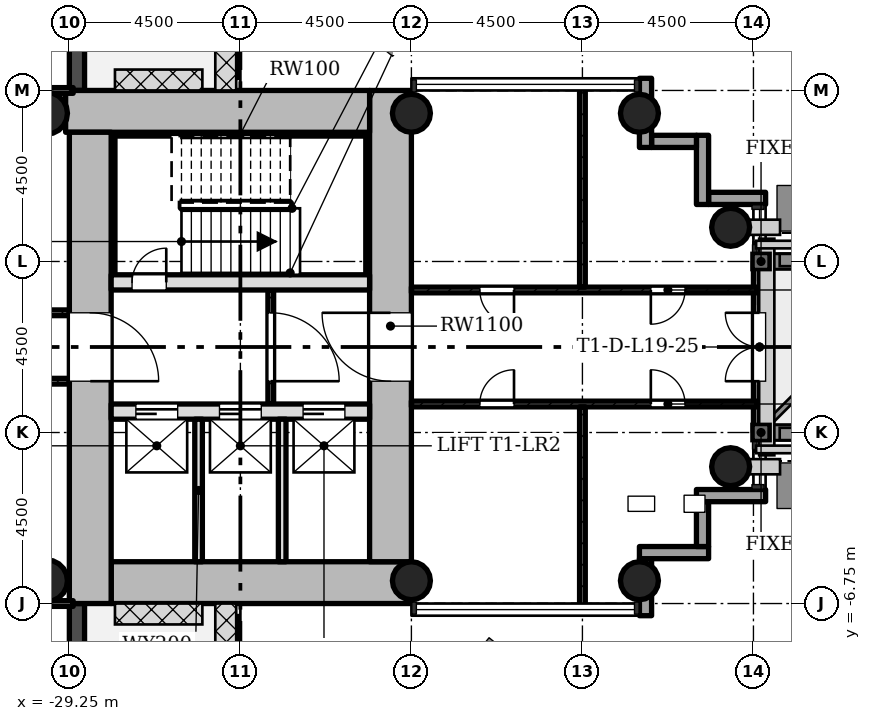
"""IFC4 building model, lengths in metres.
Left out: names, types, materials, properties, quantities, classifications, styles, units other than length and angle.
Written with IfcOpenShell. Run it as: python <this file> out.ifc"""

import sys

from ifc_helpers import new_model, si_unit, direction, frame, frame_2d, origin, origin_2d, place, context, subcontext, project, spatial, rectangle, hollow_circle, extrude, element, fill, save


model = new_model("IFC4")
c1 = context("Model", 3, precision=1e-05, world=origin(), true_north=direction((0.0, 1.0)))
c2 = subcontext(c1, "Body", "Model", "MODEL_VIEW")
j1 = project(units=[si_unit("LENGTHUNIT", "METRE"), si_unit("PLANEANGLEUNIT", "RADIAN")], contexts=[c1])
p1 = place(None, origin())
s1 = spatial("IfcSite", under=j1, at=p1, CompositionType="ELEMENT")
p2 = place(p1, origin())
s2 = spatial("IfcBuilding", under=s1, at=p2, CompositionType="ELEMENT")
p3 = place(p2, frame((0.0, 0.0, 72.1)))
s3 = spatial("IfcBuildingStorey", under=s2, at=p3, CompositionType="ELEMENT", Elevation=72.1)
p4 = place(p3, frame((-28.15, -6.2, 0.0), z_axis=(0.0, 0.0, 1.0), x_axis=(1.0, 0.0, 0.0)))
e1 = element("IfcWall", 1, at=p4, inside=s3, PredefinedType="SHEAR", context=c2, shape_type="SweptSolid", body=[
    extrude(rectangle(XDim=7.9, YDim=1.1, at=frame_2d((3.95, 0.0))), origin(), (0.0, 0.0, 1.0), 4.5),
])
p5 = place(p3, frame((-20.8, -5.65, 0.0), z_axis=(0.0, 0.0, 1.0), x_axis=(0.0, 1.0, 0.0)))
e2 = element("IfcWall", 2, at=p5, inside=s3, PredefinedType="SHEAR", context=c2, shape_type="SweptSolid", body=[
    extrude(rectangle(XDim=12.4, YDim=1.1, at=frame_2d((6.2, 0.0))), origin(), (0.0, 0.0, 1.0), 4.5),
])
p6 = place(p5, frame((4.75, 0.0, 0.0)))
e3 = element("IfcOpeningElement", 3, at=p6, cuts=e2, PredefinedType="OPENING", context=c2, shape_type="SweptSolid", body=[
    extrude(rectangle(XDim=1.8, YDim=2.1, at=frame_2d((0.9, 1.05))), frame((0.0, 0.56, 0.0), z_axis=(0.0, -1.0, 0.0), x_axis=(1.0, 0.0, 0.0)), (0.0, 0.0, 1.0), 1.12),
])
p7 = place(p3, frame((-21.35, 6.2, 0.0), z_axis=(0.0, 0.0, 1.0), x_axis=(-1.0, 0.0, 0.0)))
e4 = element("IfcWall", 4, at=p7, inside=s3, PredefinedType="SHEAR", context=c2, shape_type="SweptSolid", body=[
    extrude(rectangle(XDim=7.998, YDim=1.1, at=frame_2d((3.999, 0.0))), origin(), (0.0, 0.0, 1.0), 4.5),
])
p8 = place(p3, frame((-28.7, 5.65, 0.0), z_axis=(0.0, 0.0, 1.0), x_axis=(0.0, -1.0, 0.0)))
e5 = element("IfcWall", 5, at=p8, inside=s3, PredefinedType="SHEAR", context=c2, shape_type="SweptSolid", body=[
    extrude(rectangle(XDim=12.4, YDim=1.1, at=frame_2d((6.2, 0.0))), origin(), (0.0, 0.0, 1.0), 4.5),
])
p9 = place(p8, frame((4.75, 0.0, 0.0)))
e6 = element("IfcOpeningElement", 6, at=p9, cuts=e5, PredefinedType="OPENING", context=c2, shape_type="SweptSolid", body=[
    extrude(rectangle(XDim=1.8, YDim=2.1, at=frame_2d((0.9, 1.05))), frame((0.0, 0.56, 0.0), z_axis=(0.0, -1.0, 0.0), x_axis=(1.0, 0.0, 0.0)), (0.0, 0.0, 1.0), 1.12),
])
p10 = place(p3, frame((-28.15, -1.7, 0.0), z_axis=(0.0, 0.0, 1.0), x_axis=(1.0, 0.0, 0.0)))
e7 = element("IfcWall", 7, at=p10, inside=s3, PredefinedType="SHEAR", context=c2, shape_type="SweptSolid", body=[
    extrude(rectangle(XDim=6.8, YDim=0.4, at=frame_2d((3.4, 0.0))), origin(), (0.0, 0.0, 1.0), 4.5),
])
p11 = place(p10, frame((0.65, 0.0, 0.0)))
e8 = element("IfcOpeningElement", 8, at=p11, cuts=e7, PredefinedType="OPENING", context=c2, shape_type="SweptSolid", body=[
    extrude(rectangle(XDim=1.1, YDim=2.1, at=frame_2d((0.55, 1.05))), frame((0.0, 0.21, 0.0), z_axis=(0.0, -1.0, 0.0), x_axis=(1.0, 0.0, 0.0)), (0.0, 0.0, 1.0), 0.42),
])
p12 = place(p10, frame((2.85, 0.0, 0.0)))
e9 = element("IfcOpeningElement", 9, at=p12, cuts=e7, PredefinedType="OPENING", context=c2, shape_type="SweptSolid", body=[
    extrude(rectangle(XDim=1.1, YDim=2.1, at=frame_2d((0.55, 1.05))), frame((0.0, 0.21, 0.0), z_axis=(0.0, -1.0, 0.0), x_axis=(1.0, 0.0, 0.0)), (0.0, 0.0, 1.0), 0.42),
])
p13 = place(p10, frame((5.05, 0.0, 0.0)))
e10 = element("IfcOpeningElement", 10, at=p13, cuts=e7, PredefinedType="OPENING", context=c2, shape_type="SweptSolid", body=[
    extrude(rectangle(XDim=1.1, YDim=2.1, at=frame_2d((0.55, 1.05))), frame((0.0, 0.21, 0.0), z_axis=(0.0, -1.0, 0.0), x_axis=(1.0, 0.0, 0.0)), (0.0, 0.0, 1.0), 0.42),
])
p14 = place(p3, frame((-28.15, 1.7, 0.0), z_axis=(0.0, 0.0, 1.0), x_axis=(1.0, 0.0, 0.0)))
e11 = element("IfcWall", 11, at=p14, inside=s3, PredefinedType="SHEAR", context=c2, shape_type="SweptSolid", body=[
    extrude(rectangle(XDim=6.8, YDim=0.4, at=frame_2d((3.4, 0.0))), origin(), (0.0, 0.0, 1.0), 4.5),
])
p15 = place(p14, frame((0.55, 0.0, 0.0)))
e12 = element("IfcOpeningElement", 12, at=p15, cuts=e11, PredefinedType="OPENING", context=c2, shape_type="SweptSolid", body=[
    extrude(rectangle(XDim=0.9, YDim=2.1, at=frame_2d((0.45, 1.05))), frame((0.0, 0.21, 0.0), z_axis=(0.0, -1.0, 0.0), x_axis=(1.0, 0.0, 0.0)), (0.0, 0.0, 1.0), 0.42),
])
for number, where, z_axis, x_axis in (
    (13, (-20.25, -6.15, 0.0), (0.0, 0.0, 1.0), (1.0, 0.0, 0.0)),
    (14, (-20.25, 6.15, 0.0), (0.0, 0.0, 1.0), (1.0, 0.0, 0.0)),
    (15, (-14.25, -6.15, 0.0), (0.0, 0.0, 1.0), (1.0, 0.0, 0.0)),
    (16, (-14.25, 6.15, 0.0), (0.0, 0.0, 1.0), (1.0, 0.0, 0.0)),
    (17, (-11.85, -3.15, 0.0), (0.0, 0.0, 1.0), (1.0, 0.0, 0.0)),
    (18, (-11.85, 3.15, 0.0), (0.0, 0.0, 1.0), (1.0, 0.0, 0.0)),
):
    element("IfcColumn", number, at=place(p3, frame(where, z_axis=z_axis, x_axis=x_axis)), inside=s3, PredefinedType="COLUMN", context=c2, shape_type="SweptSolid", body=[
        extrude(hollow_circle(Radius=0.5, WallThickness=0.036, at=origin_2d()), origin(), (0.0, 0.0, 1.0), 4.5),
    ])
for number, where, z_axis, x_axis in (
    (19, (-29.85, -6.15, 0.0), (0.0, 0.0, 1.0), (1.0, 0.0, 0.0)),
    (20, (-29.85, 6.15, 0.0), (0.0, 0.0, 1.0), (1.0, 0.0, 0.0)),
):
    element("IfcColumn", number, at=place(p3, frame(where, z_axis=z_axis, x_axis=x_axis)), inside=s3, PredefinedType="COLUMN", context=c2, shape_type="SweptSolid", body=[
        extrude(hollow_circle(Radius=0.55, WallThickness=0.04, at=origin_2d()), origin(), (0.0, 0.0, 1.0), 4.5),
    ])
p16 = place(p3, frame((-29.05, -11.25, -0.02), z_axis=(0.0, 0.0, 1.0), x_axis=(0.0, 1.0, 0.0)))
e21 = element("IfcWall", 21, at=p16, inside=s3, PredefinedType="STANDARD", context=c2, shape_type="SweptSolid", body=[
    extrude(rectangle(XDim=4.5, YDim=0.4, at=frame_2d((2.25, 0.0))), origin(), (0.0, 0.0, 1.0), 4.22),
])
p17 = place(p16, frame((1.35, 0.0, 0.02)))
e22 = element("IfcOpeningElement", 22, at=p17, cuts=e21, PredefinedType="OPENING", context=c2, shape_type="SweptSolid", body=[
    extrude(rectangle(XDim=1.8, YDim=2.1, at=frame_2d((0.9, 1.05))), frame((0.0, 0.21, 0.0), z_axis=(0.0, -1.0, 0.0), x_axis=(1.0, 0.0, 0.0)), (0.0, 0.0, 1.0), 0.42),
])
p18 = place(p3, frame((-14.09, -7.07, -0.3), z_axis=(0.0, 0.0, 1.0), x_axis=(0.0, 1.0, 0.0)))
e23 = element("IfcWall", 23, at=p18, inside=s3, PredefinedType="STANDARD", context=c2, shape_type="SweptSolid", body=[
    extrude(rectangle(XDim=1.5, YDim=0.32, at=frame_2d((0.75, 0.0))), origin(), (0.0, 0.0, 1.0), 4.5),
])
p19 = place(p3, frame((-14.25, -5.41, -0.3), z_axis=(0.0, 0.0, 1.0), x_axis=(1.0, 0.0, 0.0)))
e24 = element("IfcWall", 24, at=p19, inside=s3, PredefinedType="STANDARD", context=c2, shape_type="SweptSolid", body=[
    extrude(rectangle(XDim=1.82, YDim=0.32, at=frame_2d((0.91, 0.0))), origin(), (0.0, 0.0, 1.0), 4.5),
])
p20 = place(p3, frame((-12.59, -5.25, -0.3), z_axis=(0.0, 0.0, 1.0), x_axis=(0.0, 1.0, 0.0)))
e25 = element("IfcWall", 25, at=p20, inside=s3, PredefinedType="STANDARD", context=c2, shape_type="SweptSolid", body=[
    extrude(rectangle(XDim=1.18, YDim=0.32, at=frame_2d((0.59, 0.0))), origin(), (0.0, 0.0, 1.0), 4.5),
])
p21 = place(p3, frame((-12.75, -3.91, -0.3), z_axis=(0.0, 0.0, 1.0), x_axis=(1.0, 0.0, 0.0)))
e26 = element("IfcWall", 26, at=p21, inside=s3, PredefinedType="STANDARD", context=c2, shape_type="SweptSolid", body=[
    extrude(rectangle(XDim=1.82, YDim=0.32, at=frame_2d((0.91, 0.0))), origin(), (0.0, 0.0, 1.0), 4.5),
])
p22 = place(p3, frame((-11.09, -2.25, -0.12), z_axis=(0.0, 0.0, 1.0), x_axis=(0.0, 1.0, 0.0)))
e27 = element("IfcWall", 27, at=p22, inside=s3, PredefinedType="STANDARD", context=c2, shape_type="SweptSolid", body=[
    extrude(rectangle(XDim=4.5, YDim=0.32, at=frame_2d((2.25, 0.0))), origin(), (0.0, 0.0, 1.0), 4.32),
])
p23 = place(p22, frame((1.35, 0.0, 0.0)))
e28 = element("IfcOpeningElement", 28, at=p23, cuts=e27, PredefinedType="OPENING", context=c2, shape_type="SweptSolid", body=[
    extrude(rectangle(XDim=1.8, YDim=2.1, at=frame_2d((0.9, 1.05))), frame((0.0, 0.17, 0.0), z_axis=(0.0, -1.0, 0.0), x_axis=(1.0, 0.0, 0.0)), (0.0, 0.0, 1.0), 0.34),
])
p24 = place(p3, frame((-10.93, 3.91, -0.3), z_axis=(0.0, 0.0, 1.0), x_axis=(-1.0, 0.0, 0.0)))
e29 = element("IfcWall", 29, at=p24, inside=s3, PredefinedType="STANDARD", context=c2, shape_type="SweptSolid", body=[
    extrude(rectangle(XDim=1.5, YDim=0.32, at=frame_2d((0.75, 0.0))), origin(), (0.0, 0.0, 1.0), 4.5),
])
p25 = place(p3, frame((-12.59, 3.75, -0.3), z_axis=(0.0, 0.0, 1.0), x_axis=(0.0, 1.0, 0.0)))
e30 = element("IfcWall", 30, at=p25, inside=s3, PredefinedType="STANDARD", context=c2, shape_type="SweptSolid", body=[
    extrude(rectangle(XDim=1.82, YDim=0.32, at=frame_2d((0.91, 0.0))), origin(), (0.0, 0.0, 1.0), 4.5),
])
p26 = place(p3, frame((-12.75, 5.41, -0.3), z_axis=(0.0, 0.0, 1.0), x_axis=(-1.0, 0.0, 0.0)))
e31 = element("IfcWall", 31, at=p26, inside=s3, PredefinedType="STANDARD", context=c2, shape_type="SweptSolid", body=[
    extrude(rectangle(XDim=1.18, YDim=0.32, at=frame_2d((0.59, 0.0))), origin(), (0.0, 0.0, 1.0), 4.5),
])
p27 = place(p3, frame((-14.09, 5.25, -0.3), z_axis=(0.0, 0.0, 1.0), x_axis=(0.0, 1.0, 0.0)))
e32 = element("IfcWall", 32, at=p27, inside=s3, PredefinedType="STANDARD", context=c2, shape_type="SweptSolid", body=[
    extrude(rectangle(XDim=1.82, YDim=0.32, at=frame_2d((0.91, 0.0))), origin(), (0.0, 0.0, 1.0), 4.5),
])
p28 = place(p3, frame((-29.05, 6.75, -0.02), z_axis=(0.0, 0.0, 1.0), x_axis=(0.0, 1.0, 0.0)))
e33 = element("IfcWall", 33, at=p28, inside=s3, PredefinedType="STANDARD", context=c2, shape_type="SweptSolid", body=[
    extrude(rectangle(XDim=4.5, YDim=0.4, at=frame_2d((2.25, 0.0))), origin(), (0.0, 0.0, 1.0), 4.22),
])
p29 = place(p28, frame((1.35, 0.0, 0.02)))
e34 = element("IfcOpeningElement", 34, at=p29, cuts=e33, PredefinedType="OPENING", context=c2, shape_type="SweptSolid", body=[
    extrude(rectangle(XDim=1.8, YDim=2.1, at=frame_2d((0.9, 1.05))), frame((0.0, 0.21, 0.0), z_axis=(0.0, -1.0, 0.0), x_axis=(1.0, 0.0, 0.0)), (0.0, 0.0, 1.0), 0.42),
])
p30 = place(p3, frame((-23.95, -1.5, 0.0), z_axis=(0.0, 0.0, 1.0), x_axis=(0.0, 1.0, 0.0)))
e35 = element("IfcWall", 35, at=p30, inside=s3, PredefinedType="PARTITIONING", context=c2, shape_type="SweptSolid", body=[
    extrude(rectangle(XDim=3.0, YDim=0.15, at=frame_2d((1.5, 0.0))), origin(), (0.0, 0.0, 1.0), 4.08),
])
p31 = place(p30, frame((0.6, 0.0, 0.0)))
e36 = element("IfcOpeningElement", 36, at=p31, cuts=e35, PredefinedType="OPENING", context=c2, shape_type="SweptSolid", body=[
    extrude(rectangle(XDim=1.8, YDim=2.1, at=frame_2d((0.9, 1.05))), frame((0.0, 0.085, 0.0), z_axis=(0.0, -1.0, 0.0), x_axis=(1.0, 0.0, 0.0)), (0.0, 0.0, 1.0), 0.17),
])
for number, where, z_axis, x_axis in (
    (37, (-25.85, -5.65, 0.0), (0.0, 0.0, 1.0), (0.0, 1.0, 0.0)),
    (38, (-23.65, -5.65, 0.0), (0.0, 0.0, 1.0), (0.0, 1.0, 0.0)),
):
    element("IfcWall", number, at=place(p3, frame(where, z_axis=z_axis, x_axis=x_axis)), inside=s3, PredefinedType="SOLIDWALL", context=c2, shape_type="SweptSolid", body=[
        extrude(rectangle(XDim=3.75, YDim=0.2, at=frame_2d((1.875, 0.0))), origin(), (0.0, 0.0, 1.0), 4.08),
    ])
p32 = place(p3, frame((-35.1, 0.9, 0.0), z_axis=(0.0, 0.0, 1.0), x_axis=(1.0, 0.0, 0.0)))
e39 = element("IfcWall", 39, at=p32, inside=s3, PredefinedType="PARTITIONING", context=c2, shape_type="SweptSolid", body=[
    extrude(rectangle(XDim=5.85, YDim=0.15, at=frame_2d((2.925, 0.0))), origin(), (0.0, 0.0, 1.0), 4.08),
])
p33 = place(p32, frame((2.475, 0.0, 0.0)))
e40 = element("IfcOpeningElement", 40, at=p33, cuts=e39, PredefinedType="OPENING", context=c2, shape_type="SweptSolid", body=[
    extrude(rectangle(XDim=0.9, YDim=2.1, at=frame_2d((0.45, 1.05))), frame((0.0, 0.085, 0.0), z_axis=(0.0, -1.0, 0.0), x_axis=(1.0, 0.0, 0.0)), (0.0, 0.0, 1.0), 0.17),
])
p34 = place(p3, frame((-35.1, -0.9, 0.0), z_axis=(0.0, 0.0, 1.0), x_axis=(1.0, 0.0, 0.0)))
e41 = element("IfcWall", 41, at=p34, inside=s3, PredefinedType="PARTITIONING", context=c2, shape_type="SweptSolid", body=[
    extrude(rectangle(XDim=5.85, YDim=0.15, at=frame_2d((2.925, 0.0))), origin(), (0.0, 0.0, 1.0), 4.08),
])
p35 = place(p34, frame((2.475, 0.0, 0.0)))
e42 = element("IfcOpeningElement", 42, at=p35, cuts=e41, PredefinedType="OPENING", context=c2, shape_type="SweptSolid", body=[
    extrude(rectangle(XDim=0.9, YDim=2.1, at=frame_2d((0.45, 1.05))), frame((0.0, 0.085, 0.0), z_axis=(0.0, -1.0, 0.0), x_axis=(1.0, 0.0, 0.0)), (0.0, 0.0, 1.0), 0.17),
])
p36 = place(p3, frame((-20.25, 1.5, 0.0), z_axis=(0.0, 0.0, 1.0), x_axis=(1.0, 0.0, 0.0)))
e43 = element("IfcWall", 43, at=p36, inside=s3, PredefinedType="PARTITIONING", context=c2, shape_type="SweptSolid", body=[
    extrude(rectangle(XDim=9.1, YDim=0.15, at=frame_2d((4.55, 0.0))), origin(), (0.0, 0.0, 1.0), 4.08),
])
p37 = place(p36, frame((1.8, 0.0, 0.0)))
e44 = element("IfcOpeningElement", 44, at=p37, cuts=e43, PredefinedType="OPENING", context=c2, shape_type="SweptSolid", body=[
    extrude(rectangle(XDim=0.9, YDim=2.1, at=frame_2d((0.45, 1.05))), frame((0.0, 0.085, 0.0), z_axis=(0.0, -1.0, 0.0), x_axis=(1.0, 0.0, 0.0)), (0.0, 0.0, 1.0), 0.17),
])
p38 = place(p36, frame((6.3, 0.0, 0.0)))
e45 = element("IfcOpeningElement", 45, at=p38, cuts=e43, PredefinedType="OPENING", context=c2, shape_type="SweptSolid", body=[
    extrude(rectangle(XDim=0.9, YDim=2.1, at=frame_2d((0.45, 1.05))), frame((0.0, 0.085, 0.0), z_axis=(0.0, -1.0, 0.0), x_axis=(1.0, 0.0, 0.0)), (0.0, 0.0, 1.0), 0.17),
])
p39 = place(p3, frame((-15.75, 1.575, 0.0), z_axis=(0.0, 0.0, 1.0), x_axis=(0.0, 1.0, 0.0)))
e46 = element("IfcWall", 46, at=p39, inside=s3, PredefinedType="PARTITIONING", context=c2, shape_type="SweptSolid", body=[
    extrude(rectangle(XDim=5.275, YDim=0.15, at=frame_2d((2.638, 0.0))), origin(), (0.0, 0.0, 1.0), 4.08),
])
p40 = place(p3, frame((-20.25, -1.5, 0.0), z_axis=(0.0, 0.0, 1.0), x_axis=(1.0, 0.0, 0.0)))
e47 = element("IfcWall", 47, at=p40, inside=s3, PredefinedType="PARTITIONING", context=c2, shape_type="SweptSolid", body=[
    extrude(rectangle(XDim=9.1, YDim=0.15, at=frame_2d((4.55, 0.0))), origin(), (0.0, 0.0, 1.0), 4.08),
])
p41 = place(p40, frame((1.8, 0.0, 0.0)))
e48 = element("IfcOpeningElement", 48, at=p41, cuts=e47, PredefinedType="OPENING", context=c2, shape_type="SweptSolid", body=[
    extrude(rectangle(XDim=0.9, YDim=2.1, at=frame_2d((0.45, 1.05))), frame((0.0, 0.085, 0.0), z_axis=(0.0, -1.0, 0.0), x_axis=(1.0, 0.0, 0.0)), (0.0, 0.0, 1.0), 0.17),
])
p42 = place(p40, frame((6.3, 0.0, 0.0)))
e49 = element("IfcOpeningElement", 49, at=p42, cuts=e47, PredefinedType="OPENING", context=c2, shape_type="SweptSolid", body=[
    extrude(rectangle(XDim=0.9, YDim=2.1, at=frame_2d((0.45, 1.05))), frame((0.0, 0.085, 0.0), z_axis=(0.0, -1.0, 0.0), x_axis=(1.0, 0.0, 0.0)), (0.0, 0.0, 1.0), 0.17),
])
p43 = place(p3, frame((-15.75, -1.575, 0.0), z_axis=(0.0, 0.0, 1.0), x_axis=(0.0, -1.0, 0.0)))
e50 = element("IfcWall", 50, at=p43, inside=s3, PredefinedType="PARTITIONING", context=c2, shape_type="SweptSolid", body=[
    extrude(rectangle(XDim=5.275, YDim=0.15, at=frame_2d((2.638, 0.0))), origin(), (0.0, 0.0, 1.0), 4.08),
])
p44 = place(p3, frame((-42.85, 6.75, 0.0), z_axis=(0.0, 0.0, 1.0), x_axis=(1.0, 0.0, 0.0)))
e51 = element("IfcWall", 51, at=p44, inside=s3, PredefinedType="PARTITIONING", context=c2, shape_type="SweptSolid", body=[
    extrude(rectangle(XDim=13.7, YDim=0.15, at=frame_2d((6.85, 0.0))), origin(), (0.0, 0.0, 1.0), 4.08),
])
p45 = place(p44, frame((5.95, 0.0, 0.0)))
e52 = element("IfcOpeningElement", 52, at=p45, cuts=e51, PredefinedType="OPENING", context=c2, shape_type="SweptSolid", body=[
    extrude(rectangle(XDim=1.8, YDim=2.1, at=frame_2d((0.9, 1.05))), frame((0.0, 0.085, 0.0), z_axis=(0.0, -1.0, 0.0), x_axis=(1.0, 0.0, 0.0)), (0.0, 0.0, 1.0), 0.17),
])
p46 = place(p3, frame((-42.85, -6.75, 0.0), z_axis=(0.0, 0.0, 1.0), x_axis=(1.0, 0.0, 0.0)))
e53 = element("IfcWall", 53, at=p46, inside=s3, PredefinedType="PARTITIONING", context=c2, shape_type="SweptSolid", body=[
    extrude(rectangle(XDim=13.7, YDim=0.15, at=frame_2d((6.85, 0.0))), origin(), (0.0, 0.0, 1.0), 4.08),
])
p47 = place(p46, frame((5.95, 0.0, 0.0)))
e54 = element("IfcOpeningElement", 54, at=p47, cuts=e53, PredefinedType="OPENING", context=c2, shape_type="SweptSolid", body=[
    extrude(rectangle(XDim=1.8, YDim=2.1, at=frame_2d((0.9, 1.05))), frame((0.0, 0.085, 0.0), z_axis=(0.0, -1.0, 0.0), x_axis=(1.0, 0.0, 0.0)), (0.0, 0.0, 1.0), 0.17),
])
p48 = place(p3, frame((-21.4, 1.9, 0.0), z_axis=(0.0, 0.0, 1.0), x_axis=(0.0, 1.0, 0.0)))
e55 = element("IfcWall", 55, at=p48, inside=s3, PredefinedType="SHEAR", context=c2, shape_type="SweptSolid", body=[
    extrude(rectangle(XDim=3.75, YDim=0.1, at=frame_2d((1.875, 0.0))), origin(), (0.0, 0.0, 1.0), 4.5),
])
p49 = place(p3, frame((-28.05, 5.6, 0.0), z_axis=(0.0, 0.0, 1.0), x_axis=(1.0, 0.0, 0.0)))
e56 = element("IfcWall", 56, at=p49, inside=s3, PredefinedType="SHEAR", context=c2, shape_type="SweptSolid", body=[
    extrude(rectangle(XDim=6.6, YDim=0.1, at=frame_2d((3.3, 0.0))), origin(), (0.0, 0.0, 1.0), 4.5),
])
p50 = place(p3, frame((-28.1, 1.9, 0.0), z_axis=(0.0, 0.0, 1.0), x_axis=(0.0, 1.0, 0.0)))
e57 = element("IfcWall", 57, at=p50, inside=s3, PredefinedType="SHEAR", context=c2, shape_type="SweptSolid", body=[
    extrude(rectangle(XDim=3.75, YDim=0.1, at=frame_2d((1.875, 0.0))), origin(), (0.0, 0.0, 1.0), 4.5),
])
p51 = place(p23, origin())
e58 = element("IfcDoor", 58, at=p51, inside=s3, OperationType="DOUBLE_DOOR_SINGLE_SWING", PredefinedType="DOOR", context=c2, shape_type="SweptSolid", body=[
    extrude(rectangle(XDim=1.8, YDim=2.1, at=frame_2d((0.9, 1.05))), frame((0.0, 0.025, 0.0), z_axis=(0.0, -1.0, 0.0), x_axis=(1.0, 0.0, 0.0)), (0.0, 0.0, 1.0), 0.05),
])
fill(e28, e58)
p52 = place(p31, origin())
e59 = element("IfcDoor", 59, at=p52, inside=s3, OperationType="SINGLE_SWING_LEFT", PredefinedType="DOOR", context=c2, shape_type="SweptSolid", body=[
    extrude(rectangle(XDim=1.8, YDim=2.1, at=frame_2d((0.9, 1.05))), frame((0.0, 0.025, 0.0), z_axis=(0.0, -1.0, 0.0), x_axis=(1.0, 0.0, 0.0)), (0.0, 0.0, 1.0), 0.05),
])
fill(e36, e59)
p53 = place(p37, origin())
e60 = element("IfcDoor", 60, at=p53, inside=s3, OperationType="SINGLE_SWING_RIGHT", PredefinedType="DOOR", context=c2, shape_type="SweptSolid", body=[
    extrude(rectangle(XDim=0.9, YDim=2.1, at=frame_2d((0.45, 1.05))), frame((0.0, 0.025, 0.0), z_axis=(0.0, -1.0, 0.0), x_axis=(1.0, 0.0, 0.0)), (0.0, 0.0, 1.0), 0.05),
])
fill(e44, e60)
p54 = place(p38, origin())
e61 = element("IfcDoor", 61, at=p54, inside=s3, OperationType="SINGLE_SWING_LEFT", PredefinedType="DOOR", context=c2, shape_type="SweptSolid", body=[
    extrude(rectangle(XDim=0.9, YDim=2.1, at=frame_2d((0.45, 1.05))), frame((0.0, 0.025, 0.0), z_axis=(0.0, -1.0, 0.0), x_axis=(1.0, 0.0, 0.0)), (0.0, 0.0, 1.0), 0.05),
])
fill(e45, e61)
p55 = place(p41, origin())
e62 = element("IfcDoor", 62, at=p55, inside=s3, OperationType="SINGLE_SWING_LEFT", PredefinedType="DOOR", context=c2, shape_type="SweptSolid", body=[
    extrude(rectangle(XDim=0.9, YDim=2.1, at=frame_2d((0.45, 1.05))), frame((0.0, 0.025, 0.0), z_axis=(0.0, -1.0, 0.0), x_axis=(1.0, 0.0, 0.0)), (0.0, 0.0, 1.0), 0.05),
])
fill(e48, e62)
p56 = place(p42, origin())
e63 = element("IfcDoor", 63, at=p56, inside=s3, OperationType="SINGLE_SWING_RIGHT", PredefinedType="DOOR", context=c2, shape_type="SweptSolid", body=[
    extrude(rectangle(XDim=0.9, YDim=2.1, at=frame_2d((0.45, 1.05))), frame((0.0, 0.025, 0.0), z_axis=(0.0, -1.0, 0.0), x_axis=(1.0, 0.0, 0.0)), (0.0, 0.0, 1.0), 0.05),
])
fill(e49, e63)
p57 = place(p15, origin())
e64 = element("IfcDoor", 64, at=p57, inside=s3, OperationType="SINGLE_SWING_LEFT", PredefinedType="DOOR", context=c2, shape_type="SweptSolid", body=[
    extrude(rectangle(XDim=0.9, YDim=2.1, at=frame_2d((0.45, 1.05))), frame((0.0, 0.025, 0.0), z_axis=(0.0, -1.0, 0.0), x_axis=(1.0, 0.0, 0.0)), (0.0, 0.0, 1.0), 0.05),
])
fill(e12, e64)
p58 = place(p11, origin())
e65 = element("IfcDoor", 65, at=p58, inside=s3, OperationType="SLIDING_TO_LEFT", PredefinedType="DOOR", context=c2, shape_type="SweptSolid", body=[
    extrude(rectangle(XDim=1.1, YDim=2.1, at=frame_2d((0.55, 1.05))), frame((0.0, 0.025, 0.0), z_axis=(0.0, -1.0, 0.0), x_axis=(1.0, 0.0, 0.0)), (0.0, 0.0, 1.0), 0.05),
])
fill(e8, e65)
p59 = place(p12, origin())
e66 = element("IfcDoor", 66, at=p59, inside=s3, OperationType="SLIDING_TO_LEFT", PredefinedType="DOOR", context=c2, shape_type="SweptSolid", body=[
    extrude(rectangle(XDim=1.1, YDim=2.1, at=frame_2d((0.55, 1.05))), frame((0.0, 0.025, 0.0), z_axis=(0.0, -1.0, 0.0), x_axis=(1.0, 0.0, 0.0)), (0.0, 0.0, 1.0), 0.05),
])
fill(e9, e66)
p60 = place(p13, origin())
e67 = element("IfcDoor", 67, at=p60, inside=s3, OperationType="SLIDING_TO_LEFT", PredefinedType="DOOR", context=c2, shape_type="SweptSolid", body=[
    extrude(rectangle(XDim=1.1, YDim=2.1, at=frame_2d((0.55, 1.05))), frame((0.0, 0.025, 0.0), z_axis=(0.0, -1.0, 0.0), x_axis=(1.0, 0.0, 0.0)), (0.0, 0.0, 1.0), 0.05),
])
fill(e10, e67)
p61 = place(p9, origin())
e68 = element("IfcDoor", 68, at=p61, inside=s3, OperationType="SINGLE_SWING_LEFT", PredefinedType="DOOR", context=c2, shape_type="SweptSolid", body=[
    extrude(rectangle(XDim=1.8, YDim=2.1, at=frame_2d((0.9, 1.05))), frame((0.0, 0.025, 0.0), z_axis=(0.0, -1.0, 0.0), x_axis=(1.0, 0.0, 0.0)), (0.0, 0.0, 1.0), 0.05),
])
fill(e6, e68)
p62 = place(p6, origin())
e69 = element("IfcDoor", 69, at=p62, inside=s3, OperationType="SINGLE_SWING_LEFT", PredefinedType="DOOR", context=c2, shape_type="SweptSolid", body=[
    extrude(rectangle(XDim=1.8, YDim=2.1, at=frame_2d((0.9, 1.05))), frame((0.0, 0.025, 0.0), z_axis=(0.0, -1.0, 0.0), x_axis=(1.0, 0.0, 0.0)), (0.0, 0.0, 1.0), 0.05),
])
fill(e3, e69)
save(model, sys.argv[1])
